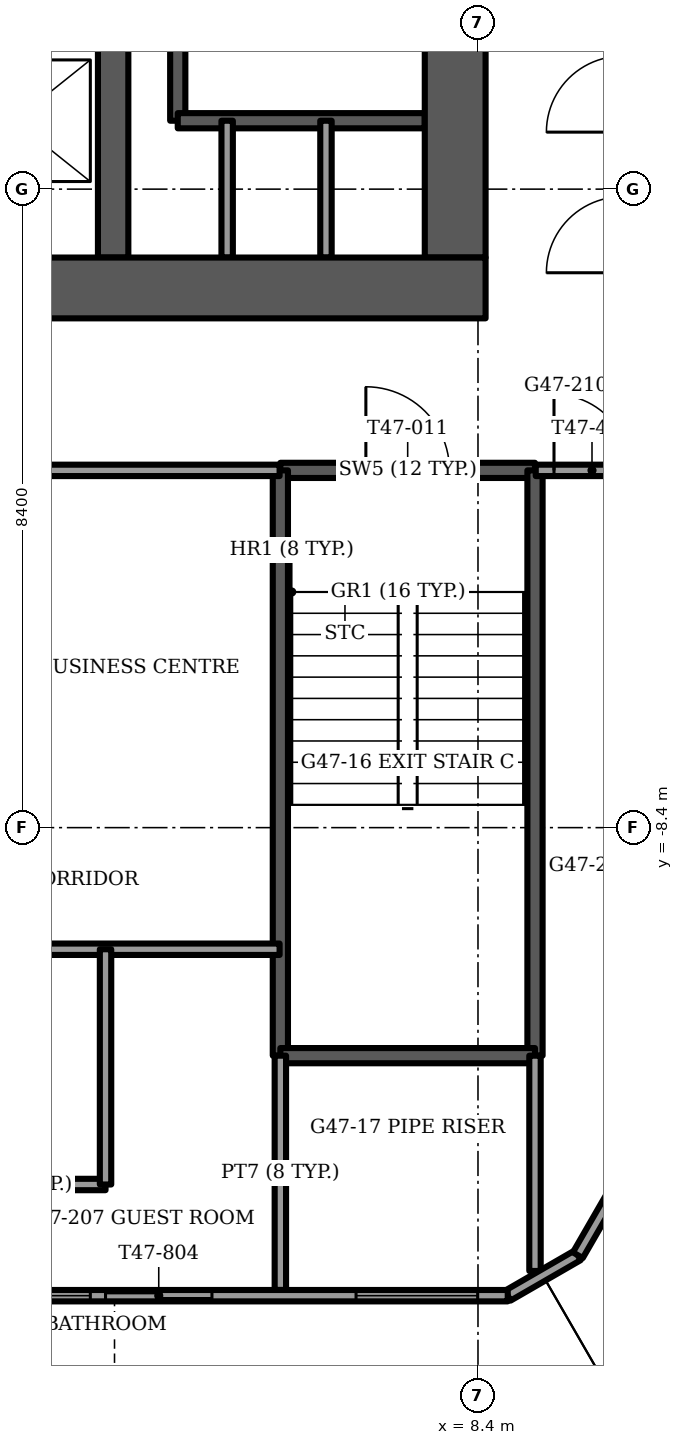
"""IFC4 building model, lengths in metres.
Left out: names, types, materials, properties, quantities, classifications, styles, units other than length and angle.
Written with IfcOpenShell. Run it as: python <this file> out.ifc"""

import sys

from ifc_helpers import new_model, si_unit, direction, frame, frame_2d, origin, place, context, subcontext, project, spatial, rectangle, extrude, element, fill, save


model = new_model("IFC4")
c1 = context("Model", 3, precision=1e-05, world=origin(), true_north=direction((0.0, 1.0)))
c2 = subcontext(c1, "Body", "Model", "MODEL_VIEW")
j1 = project(units=[si_unit("LENGTHUNIT", "METRE"), si_unit("PLANEANGLEUNIT", "RADIAN")], contexts=[c1])
p1 = place(None, origin())
s1 = spatial("IfcSite", under=j1, at=p1, CompositionType="ELEMENT")
p2 = place(p1, origin())
s2 = spatial("IfcBuilding", under=s1, at=p2, CompositionType="ELEMENT")
p3 = place(p2, frame((0.0, 0.0, 190.75)))
s3 = spatial("IfcBuildingStorey", under=s2, at=p3, CompositionType="ELEMENT", Elevation=190.75)
p4 = place(p3, frame((-8.5, -1.3, -0.3), z_axis=(0.0, 0.0, 1.0), x_axis=(1.0, 0.0, 0.0)))
e1 = element("IfcWall", 1, at=p4, inside=s3, PredefinedType="SHEAR", context=c2, shape_type="SweptSolid", body=[
    extrude(rectangle(XDim=17.0, YDim=0.8, at=frame_2d((8.5, 0.0))), origin(), (0.0, 0.0, 1.0), 3.75),
])
p5 = place(p4, frame((7.7, 0.0, 0.0)))
e2 = element("IfcOpeningElement", 2, at=p5, cuts=e1, PredefinedType="OPENING", context=c2, shape_type="SweptSolid", body=[
    extrude(rectangle(XDim=1.6, YDim=2.1, at=frame_2d((0.8, 1.05))), frame((0.0, 0.4, 0.0), z_axis=(0.0, -1.0, 0.0), x_axis=(1.0, 0.0, 0.0)), (0.0, 0.0, 1.0), 0.8),
])
p6 = place(p3, frame((8.1, -0.9, -0.3), z_axis=(0.0, 0.0, 1.0), x_axis=(0.0, 1.0, 0.0)))
e3 = element("IfcWall", 3, at=p6, inside=s3, PredefinedType="SHEAR", context=c2, shape_type="SweptSolid", body=[
    extrude(rectangle(XDim=9.8, YDim=0.8, at=frame_2d((4.9, 0.0))), origin(), (0.0, 0.0, 1.0), 3.75),
])
p7 = place(p6, frame((8.15, 0.0, 0.0)))
e4 = element("IfcOpeningElement", 4, at=p7, cuts=e3, PredefinedType="OPENING", context=c2, shape_type="SweptSolid", body=[
    extrude(rectangle(XDim=1.1, YDim=2.1, at=frame_2d((0.55, 1.05))), frame((0.0, 0.4, 0.0), z_axis=(0.0, -1.0, 0.0), x_axis=(1.0, 0.0, 0.0)), (0.0, 0.0, 1.0), 0.8),
])
p8 = place(p3, frame((3.6, -0.9, -0.3), z_axis=(0.0, 0.0, 1.0), x_axis=(0.0, 1.0, 0.0)))
e5 = element("IfcWall", 5, at=p8, inside=s3, PredefinedType="SHEAR", context=c2, shape_type="SweptSolid", body=[
    extrude(rectangle(XDim=9.8, YDim=0.4, at=frame_2d((4.9, 0.0))), origin(), (0.0, 0.0, 1.0), 3.75),
])
p9 = place(p3, frame((-8.792, -14.558, 0.0), z_axis=(0.0, 0.0, 1.0), x_axis=(1.0, 0.0, 0.0)))
e6 = element("IfcWall", 6, at=p9, inside=s3, PredefinedType="SOLIDWALL", context=c2, shape_type="SweptSolid", body=[
    extrude(rectangle(XDim=17.583, YDim=0.15, at=frame_2d((8.792, 0.0))), origin(), (0.0, 0.0, 1.0), 3.45),
])
p10 = place(p9, frame((3.342, 0.0, 0.15)))
e7 = element("IfcOpeningElement", 7, at=p10, cuts=e6, PredefinedType="OPENING", context=c2, shape_type="SweptSolid", body=[
    extrude(rectangle(XDim=1.6, YDim=2.85, at=frame_2d((0.8, 1.425))), frame((0.0, 0.075, 0.0), z_axis=(0.0, -1.0, 0.0), x_axis=(1.0, 0.0, 0.0)), (0.0, 0.0, 1.0), 0.15),
])
p11 = place(p9, frame((4.991, 0.0, 0.0)))
e8 = element("IfcOpeningElement", 8, at=p11, cuts=e6, PredefinedType="OPENING", context=c2, shape_type="SweptSolid", body=[
    extrude(rectangle(XDim=1.4, YDim=2.4, at=frame_2d((0.7, 1.2))), frame((0.0, 0.075, 0.0), z_axis=(0.0, -1.0, 0.0), x_axis=(1.0, 0.0, 0.0)), (0.0, 0.0, 1.0), 0.15),
])
p12 = place(p9, frame((8.241, 0.0, 0.15)))
e9 = element("IfcOpeningElement", 9, at=p12, cuts=e6, PredefinedType="OPENING", context=c2, shape_type="SweptSolid", body=[
    extrude(rectangle(XDim=0.9, YDim=2.85, at=frame_2d((0.45, 1.425))), frame((0.0, 0.075, 0.0), z_axis=(0.0, -1.0, 0.0), x_axis=(1.0, 0.0, 0.0)), (0.0, 0.0, 1.0), 0.15),
])
p13 = place(p9, frame((11.191, 0.0, 0.15)))
e10 = element("IfcOpeningElement", 10, at=p13, cuts=e6, PredefinedType="OPENING", context=c2, shape_type="SweptSolid", body=[
    extrude(rectangle(XDim=0.9, YDim=2.85, at=frame_2d((0.45, 1.425))), frame((0.0, 0.075, 0.0), z_axis=(0.0, -1.0, 0.0), x_axis=(1.0, 0.0, 0.0)), (0.0, 0.0, 1.0), 0.15),
])
p14 = place(p9, frame((12.292, 0.0, 0.0)))
e11 = element("IfcOpeningElement", 11, at=p14, cuts=e6, PredefinedType="OPENING", context=c2, shape_type="SweptSolid", body=[
    extrude(rectangle(XDim=1.4, YDim=2.4, at=frame_2d((0.7, 1.2))), frame((0.0, 0.075, 0.0), z_axis=(0.0, -1.0, 0.0), x_axis=(1.0, 0.0, 0.0)), (0.0, 0.0, 1.0), 0.15),
])
p15 = place(p9, frame((0.396, 0.0, 0.15)))
e12 = element("IfcOpeningElement", 12, at=p15, cuts=e6, PredefinedType="OPENING", context=c2, shape_type="SweptSolid", body=[
    extrude(rectangle(XDim=1.6, YDim=2.73, at=frame_2d((0.8, 1.365))), frame((0.0, 0.075, 0.0), z_axis=(0.0, -1.0, 0.0), x_axis=(1.0, 0.0, 0.0)), (0.0, 0.0, 1.0), 0.15),
])
p16 = place(p9, frame((15.587, 0.0, 0.15)))
e13 = element("IfcOpeningElement", 13, at=p16, cuts=e6, PredefinedType="OPENING", context=c2, shape_type="SweptSolid", body=[
    extrude(rectangle(XDim=1.6, YDim=2.73, at=frame_2d((0.8, 1.365))), frame((0.0, 0.075, 0.0), z_axis=(0.0, -1.0, 0.0), x_axis=(1.0, 0.0, 0.0)), (0.0, 0.0, 1.0), 0.15),
])
p17 = place(p3, frame((9.714, -14.025, 0.0), z_axis=(0.0, 0.0, 1.0), x_axis=(0.500006098247, 0.866021882931, 0.0)))
e14 = element("IfcWall", 14, at=p17, inside=s3, PredefinedType="SOLIDWALL", context=c2, shape_type="SweptSolid", body=[
    extrude(rectangle(XDim=14.578, YDim=0.15, at=frame_2d((7.289, 0.0))), origin(), (0.0, 0.0, 1.0), 3.45),
])
p18 = place(p17, frame((1.289, 0.0, 0.15)))
e15 = element("IfcOpeningElement", 15, at=p18, cuts=e14, PredefinedType="OPENING", context=c2, shape_type="SweptSolid", body=[
    extrude(rectangle(XDim=1.6, YDim=2.85, at=frame_2d((0.8, 1.425))), frame((0.0, 0.075, 0.0), z_axis=(0.0, -1.0, 0.0), x_axis=(1.0, 0.0, 0.0)), (0.0, 0.0, 1.0), 0.15),
])
p19 = place(p17, frame((3.489, 0.0, 0.0)))
e16 = element("IfcOpeningElement", 16, at=p19, cuts=e14, PredefinedType="OPENING", context=c2, shape_type="SweptSolid", body=[
    extrude(rectangle(XDim=1.4, YDim=2.4, at=frame_2d((0.7, 1.2))), frame((0.0, 0.075, 0.0), z_axis=(0.0, -1.0, 0.0), x_axis=(1.0, 0.0, 0.0)), (0.0, 0.0, 1.0), 0.15),
])
p20 = place(p17, frame((5.489, 0.0, 0.15)))
e17 = element("IfcOpeningElement", 17, at=p20, cuts=e14, PredefinedType="OPENING", context=c2, shape_type="SweptSolid", body=[
    extrude(rectangle(XDim=0.9, YDim=2.85, at=frame_2d((0.45, 1.425))), frame((0.0, 0.075, 0.0), z_axis=(0.0, -1.0, 0.0), x_axis=(1.0, 0.0, 0.0)), (0.0, 0.0, 1.0), 0.15),
])
p21 = place(p17, frame((6.646, 0.0, 0.0)))
e18 = element("IfcOpeningElement", 18, at=p21, cuts=e14, PredefinedType="OPENING", context=c2, shape_type="SweptSolid", body=[
    extrude(rectangle(XDim=1.4, YDim=2.4, at=frame_2d((0.7, 1.2))), frame((0.0, 0.075, 0.0), z_axis=(0.0, -1.0, 0.0), x_axis=(1.0, 0.0, 0.0)), (0.0, 0.0, 1.0), 0.15),
])
p22 = place(p17, frame((12.298, 0.0, 0.15)))
e19 = element("IfcOpeningElement", 19, at=p22, cuts=e14, PredefinedType="OPENING", context=c2, shape_type="SweptSolid", body=[
    extrude(rectangle(XDim=0.9, YDim=2.85, at=frame_2d((0.45, 1.425))), frame((0.0, 0.075, 0.0), z_axis=(0.0, -1.0, 0.0), x_axis=(1.0, 0.0, 0.0)), (0.0, 0.0, 1.0), 0.15),
])
p23 = place(p17, frame((10.198, 0.0, 0.15)))
e20 = element("IfcOpeningElement", 20, at=p23, cuts=e14, PredefinedType="OPENING", context=c2, shape_type="SweptSolid", body=[
    extrude(rectangle(XDim=1.4, YDim=2.85, at=frame_2d((0.7, 1.425))), frame((0.0, 0.075, 0.0), z_axis=(0.0, -1.0, 0.0), x_axis=(1.0, 0.0, 0.0)), (0.0, 0.0, 1.0), 0.15),
])
p24 = place(p3, frame((17.003, -0.335, 0.0), z_axis=(0.0, 0.0, 1.0), x_axis=(-0.50000659594, 0.866021595583, 0.0)))
e21 = element("IfcWall", 21, at=p24, inside=s3, PredefinedType="SOLIDWALL", context=c2, shape_type="SweptSolid", body=[
    extrude(rectangle(XDim=20.354, YDim=0.15, at=frame_2d((10.177, 0.0))), origin(), (0.0, 0.0, 1.0), 3.45),
])
p25 = place(p24, frame((1.288, 0.0, 0.15)))
e22 = element("IfcOpeningElement", 22, at=p25, cuts=e21, PredefinedType="OPENING", context=c2, shape_type="SweptSolid", body=[
    extrude(rectangle(XDim=0.9, YDim=2.85, at=frame_2d((0.45, 1.425))), frame((0.0, 0.075, 0.0), z_axis=(0.0, -1.0, 0.0), x_axis=(1.0, 0.0, 0.0)), (0.0, 0.0, 1.0), 0.15),
])
p26 = place(p24, frame((2.892, 0.0, 0.0)))
e23 = element("IfcOpeningElement", 23, at=p26, cuts=e21, PredefinedType="OPENING", context=c2, shape_type="SweptSolid", body=[
    extrude(rectangle(XDim=1.4, YDim=2.4, at=frame_2d((0.7, 1.2))), frame((0.0, 0.075, 0.0), z_axis=(0.0, -1.0, 0.0), x_axis=(1.0, 0.0, 0.0)), (0.0, 0.0, 1.0), 0.15),
])
p27 = place(p24, frame((6.138, 0.0, 0.15)))
e24 = element("IfcOpeningElement", 24, at=p27, cuts=e21, PredefinedType="OPENING", context=c2, shape_type="SweptSolid", body=[
    extrude(rectangle(XDim=0.9, YDim=2.85, at=frame_2d((0.45, 1.425))), frame((0.0, 0.075, 0.0), z_axis=(0.0, -1.0, 0.0), x_axis=(1.0, 0.0, 0.0)), (0.0, 0.0, 1.0), 0.15),
])
p28 = place(p24, frame((7.092, 0.0, 0.15)))
e25 = element("IfcOpeningElement", 25, at=p28, cuts=e21, PredefinedType="OPENING", context=c2, shape_type="SweptSolid", body=[
    extrude(rectangle(XDim=1.4, YDim=2.85, at=frame_2d((0.7, 1.425))), frame((0.0, 0.075, 0.0), z_axis=(0.0, -1.0, 0.0), x_axis=(1.0, 0.0, 0.0)), (0.0, 0.0, 1.0), 0.15),
])
p29 = place(p24, frame((9.092, 0.0, 0.15)))
e26 = element("IfcOpeningElement", 26, at=p29, cuts=e21, PredefinedType="OPENING", context=c2, shape_type="SweptSolid", body=[
    extrude(rectangle(XDim=1.6, YDim=2.85, at=frame_2d((0.8, 1.425))), frame((0.0, 0.075, 0.0), z_axis=(0.0, -1.0, 0.0), x_axis=(1.0, 0.0, 0.0)), (0.0, 0.0, 1.0), 0.15),
])
p30 = place(p24, frame((11.292, 0.0, 0.15)))
e27 = element("IfcOpeningElement", 27, at=p30, cuts=e21, PredefinedType="OPENING", context=c2, shape_type="SweptSolid", body=[
    extrude(rectangle(XDim=1.4, YDim=2.85, at=frame_2d((0.7, 1.425))), frame((0.0, 0.075, 0.0), z_axis=(0.0, -1.0, 0.0), x_axis=(1.0, 0.0, 0.0)), (0.0, 0.0, 1.0), 0.15),
])
p31 = place(p24, frame((13.834, 0.0, 0.15)))
e28 = element("IfcOpeningElement", 28, at=p31, cuts=e21, PredefinedType="OPENING", context=c2, shape_type="SweptSolid", body=[
    extrude(rectangle(XDim=1.6, YDim=2.85, at=frame_2d((0.8, 1.425))), frame((0.0, 0.075, 0.0), z_axis=(0.0, -1.0, 0.0), x_axis=(1.0, 0.0, 0.0)), (0.0, 0.0, 1.0), 0.15),
])
p32 = place(p24, frame((18.023, 0.0, 0.15)))
e29 = element("IfcOpeningElement", 29, at=p32, cuts=e21, PredefinedType="OPENING", context=c2, shape_type="SweptSolid", body=[
    extrude(rectangle(XDim=1.6, YDim=2.73, at=frame_2d((0.8, 1.365))), frame((0.0, 0.075, 0.0), z_axis=(0.0, -1.0, 0.0), x_axis=(1.0, 0.0, 0.0)), (0.0, 0.0, 1.0), 0.15),
])
p33 = place(p3, frame((8.792, -14.558, 0.0), z_axis=(0.0, 0.0, 1.0), x_axis=(0.866048165231, 0.499960573946, 0.0)))
e30 = element("IfcWall", 30, at=p33, inside=s3, PredefinedType="SOLIDWALL", context=c2, shape_type="SweptSolid", body=[
    extrude(rectangle(XDim=1.065, YDim=0.15, at=frame_2d((0.532, 0.0))), origin(), (0.0, 0.0, 1.0), 3.45),
])
p34 = place(p3, frame((4.45, 0.9, -0.3), z_axis=(0.0, 0.0, 1.0), x_axis=(0.0, 1.0, 0.0)))
e31 = element("IfcWall", 31, at=p34, inside=s3, PredefinedType="SOLIDWALL", context=c2, shape_type="SweptSolid", body=[
    extrude(rectangle(XDim=8.0, YDim=0.2, at=frame_2d((4.0, 0.0))), origin(), (0.0, 0.0, 1.0), 3.75),
])
p35 = place(p3, frame((4.45, 0.9, -0.3), z_axis=(0.0, 0.0, 1.0), x_axis=(1.0, 0.0, 0.0)))
e32 = element("IfcWall", 32, at=p35, inside=s3, PredefinedType="SOLIDWALL", context=c2, shape_type="SweptSolid", body=[
    extrude(rectangle(XDim=3.25, YDim=0.2, at=frame_2d((1.625, 0.0))), origin(), (0.0, 0.0, 1.0), 3.75),
])
for number, where, z_axis, x_axis in (
    (33, (5.1, -0.9, 0.0), (0.0, 0.0, 1.0), (0.0, 1.0, 0.0)),
    (34, (6.4, -0.9, 0.0), (0.0, 0.0, 1.0), (0.0, 1.0, 0.0)),
):
    element("IfcWall", number, at=place(p3, frame(where, z_axis=z_axis, x_axis=x_axis)), inside=s3, PredefinedType="PARTITIONING", context=c2, shape_type="SweptSolid", body=[
        extrude(rectangle(XDim=1.8, YDim=0.15, at=frame_2d((0.9, 0.0))), origin(), (0.0, 0.0, 1.0), 3.45),
    ])
p36 = place(p3, frame((5.8, -3.7, -0.3), z_axis=(0.0, 0.0, 1.0), x_axis=(1.0, 0.0, 0.0)))
e35 = element("IfcWall", 35, at=p36, inside=s3, PredefinedType="SOLIDWALL", context=c2, shape_type="SweptSolid", body=[
    extrude(rectangle(XDim=3.35, YDim=0.2, at=frame_2d((1.675, 0.0))), origin(), (0.0, 0.0, 1.0), 3.75),
])
p37 = place(p36, frame((1.125, 0.0, 0.0)))
e36 = element("IfcOpeningElement", 36, at=p37, cuts=e35, PredefinedType="OPENING", context=c2, shape_type="SweptSolid", body=[
    extrude(rectangle(XDim=1.1, YDim=2.1, at=frame_2d((0.55, 1.05))), frame((0.0, 0.1, 0.0), z_axis=(0.0, -1.0, 0.0), x_axis=(1.0, 0.0, 0.0)), (0.0, 0.0, 1.0), 0.2),
])
for number, where, z_axis, x_axis in (
    (37, (5.8, -3.7, -0.3), (0.0, 0.0, 1.0), (0.0, -1.0, 0.0)),
    (38, (9.15, -3.7, -0.3), (0.0, 0.0, 1.0), (0.0, -1.0, 0.0)),
):
    element("IfcWall", number, at=place(p3, frame(where, z_axis=z_axis, x_axis=x_axis)), inside=s3, PredefinedType="SOLIDWALL", context=c2, shape_type="SweptSolid", body=[
        extrude(rectangle(XDim=7.7, YDim=0.2, at=frame_2d((3.85, 0.0))), origin(), (0.0, 0.0, 1.0), 3.75),
    ])
p38 = place(p3, frame((5.8, -11.4, -0.3), z_axis=(0.0, 0.0, 1.0), x_axis=(1.0, 0.0, 0.0)))
e39 = element("IfcWall", 39, at=p38, inside=s3, PredefinedType="SOLIDWALL", context=c2, shape_type="SweptSolid", body=[
    extrude(rectangle(XDim=3.35, YDim=0.2, at=frame_2d((1.675, 0.0))), origin(), (0.0, 0.0, 1.0), 3.75),
])
p39 = place(p3, frame((5.8, -11.4, 0.0), z_axis=(0.0, 0.0, 1.0), x_axis=(0.0, -1.0, 0.0)))
e40 = element("IfcWall", 40, at=p39, inside=s3, PredefinedType="PARTITIONING", context=c2, shape_type="SweptSolid", body=[
    extrude(rectangle(XDim=3.083, YDim=0.15, at=frame_2d((1.542, 0.0))), origin(), (0.0, 0.0, 1.0), 3.45),
])
p40 = place(p3, frame((9.15, -11.4, 0.0), z_axis=(0.0, 0.0, 1.0), x_axis=(0.0, -1.0, 0.0)))
e41 = element("IfcWall", 41, at=p40, inside=s3, PredefinedType="PARTITIONING", context=c2, shape_type="SweptSolid", body=[
    extrude(rectangle(XDim=2.833, YDim=0.15, at=frame_2d((1.416, 0.0))), origin(), (0.0, 0.0, 1.0), 3.45),
])
p41 = place(p3, frame((0.9, -13.095, 0.0), z_axis=(0.0, 0.0, 1.0), x_axis=(1.0, 0.0, 0.0)))
e42 = element("IfcWall", 42, at=p41, inside=s3, PredefinedType="PARTITIONING", context=c2, shape_type="SweptSolid", body=[
    extrude(rectangle(XDim=2.6, YDim=0.15, at=frame_2d((1.3, 0.0))), origin(), (0.0, 0.0, 1.0), 3.45),
])
p42 = place(p41, frame((0.9, 0.0, 0.0)))
e43 = element("IfcOpeningElement", 43, at=p42, cuts=e42, PredefinedType="OPENING", context=c2, shape_type="SweptSolid", body=[
    extrude(rectangle(XDim=0.8, YDim=2.1, at=frame_2d((0.4, 1.05))), frame((0.0, 0.075, 0.0), z_axis=(0.0, -1.0, 0.0), x_axis=(1.0, 0.0, 0.0)), (0.0, 0.0, 1.0), 0.15),
])
p43 = place(p3, frame((0.9, -10.0, 0.0), z_axis=(0.0, 0.0, 1.0), x_axis=(1.0, 0.0, 0.0)))
e44 = element("IfcWall", 44, at=p43, inside=s3, PredefinedType="PARTITIONING", context=c2, shape_type="SweptSolid", body=[
    extrude(rectangle(XDim=4.89, YDim=0.15, at=frame_2d((2.445, 0.0))), origin(), (0.0, 0.0, 1.0), 3.45),
])
p44 = place(p3, frame((0.86, -3.7, 0.0), z_axis=(0.0, 0.0, 1.0), x_axis=(1.0, 0.0, 0.0)))
e45 = element("IfcWall", 45, at=p44, inside=s3, PredefinedType="PARTITIONING", context=c2, shape_type="SweptSolid", body=[
    extrude(rectangle(XDim=4.93, YDim=0.15, at=frame_2d((2.465, 0.0))), origin(), (0.0, 0.0, 1.0), 3.45),
])
p45 = place(p3, frame((9.16, -3.7, 0.0), z_axis=(0.0, 0.0, 1.0), x_axis=(1.0, 0.0, 0.0)))
e46 = element("IfcWall", 46, at=p45, inside=s3, PredefinedType="PARTITIONING", context=c2, shape_type="SweptSolid", body=[
    extrude(rectangle(XDim=6.567, YDim=0.15, at=frame_2d((3.284, 0.0))), origin(), (0.0, 0.0, 1.0), 3.45),
])
p46 = place(p45, frame((0.24, 0.0, 0.0)))
e47 = element("IfcOpeningElement", 47, at=p46, cuts=e46, PredefinedType="OPENING", context=c2, shape_type="SweptSolid", body=[
    extrude(rectangle(XDim=1.0, YDim=2.1, at=frame_2d((0.5, 1.05))), frame((0.0, 0.075, 0.0), z_axis=(0.0, -1.0, 0.0), x_axis=(1.0, 0.0, 0.0)), (0.0, 0.0, 1.0), 0.15),
])
p47 = place(p3, frame((3.5, -13.095, 0.0), z_axis=(0.0, 0.0, 1.0), x_axis=(0.0, 1.0, 0.0)))
e48 = element("IfcWall", 48, at=p47, inside=s3, PredefinedType="PARTITIONING", context=c2, shape_type="SweptSolid", body=[
    extrude(rectangle(XDim=3.095, YDim=0.15, at=frame_2d((1.547, 0.0))), origin(), (0.0, 0.0, 1.0), 3.45),
])
p48 = place(p13, origin())
e49 = element("IfcWindow", 49, at=p48, inside=s3, PartitioningType="SINGLE_PANEL", PredefinedType="WINDOW", context=c2, shape_type="SweptSolid", body=[
    extrude(rectangle(XDim=0.9, YDim=2.85, at=frame_2d((0.45, 1.425))), frame((0.0, 0.03, 0.0), z_axis=(0.0, -1.0, 0.0), x_axis=(1.0, 0.0, 0.0)), (0.0, 0.0, 1.0), 0.06),
])
fill(e10, e49)
p49 = place(p14, origin())
e50 = element("IfcDoor", 50, at=p49, inside=s3, OperationType="SLIDING_TO_LEFT", PredefinedType="DOOR", context=c2, shape_type="SweptSolid", body=[
    extrude(rectangle(XDim=1.4, YDim=2.4, at=frame_2d((0.7, 1.2))), frame((0.0, 0.025, 0.0), z_axis=(0.0, -1.0, 0.0), x_axis=(1.0, 0.0, 0.0)), (0.0, 0.0, 1.0), 0.05),
])
fill(e11, e50)
p50 = place(p16, origin())
e51 = element("IfcWindow", 51, at=p50, inside=s3, PartitioningType="SINGLE_PANEL", PredefinedType="WINDOW", context=c2, shape_type="SweptSolid", body=[
    extrude(rectangle(XDim=1.6, YDim=2.73, at=frame_2d((0.8, 1.365))), frame((0.0, 0.03, 0.0), z_axis=(0.0, -1.0, 0.0), x_axis=(1.0, 0.0, 0.0)), (0.0, 0.0, 1.0), 0.06),
])
fill(e13, e51)
p51 = place(p37, origin())
e52 = element("IfcDoor", 52, at=p51, inside=s3, OperationType="SINGLE_SWING_LEFT", PredefinedType="DOOR", context=c2, shape_type="SweptSolid", body=[
    extrude(rectangle(XDim=1.1, YDim=2.1, at=frame_2d((0.55, 1.05))), frame((0.0, 0.025, 0.0), z_axis=(0.0, -1.0, 0.0), x_axis=(1.0, 0.0, 0.0)), (0.0, 0.0, 1.0), 0.05),
])
fill(e36, e52)
p52 = place(p46, origin())
e53 = element("IfcDoor", 53, at=p52, inside=s3, OperationType="SINGLE_SWING_LEFT", PredefinedType="DOOR", context=c2, shape_type="SweptSolid", body=[
    extrude(rectangle(XDim=1.0, YDim=2.1, at=frame_2d((0.5, 1.05))), frame((0.0, 0.025, 0.0), z_axis=(0.0, -1.0, 0.0), x_axis=(1.0, 0.0, 0.0)), (0.0, 0.0, 1.0), 0.05),
])
fill(e47, e53)
save(model, sys.argv[1])
